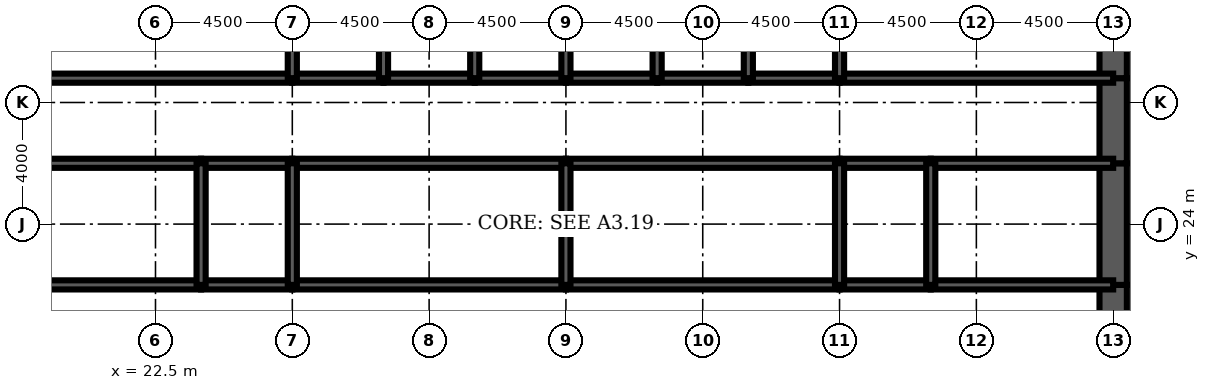
"""IFC4 building model, lengths in metres.
Left out: names, types, materials, properties, quantities, classifications, styles, units other than length and angle.
Written with IfcOpenShell. Run it as: python <this file> out.ifc"""

import sys

from ifc_helpers import new_model, si_unit, direction, frame, frame_2d, origin, place, context, subcontext, project, spatial, rectangle, extrude, element, fill, save


model = new_model("IFC4")
c1 = context("Model", 3, precision=1e-05, world=origin(), true_north=direction((0.0, 1.0)))
c2 = subcontext(c1, "Body", "Model", "MODEL_VIEW")
j1 = project(units=[si_unit("LENGTHUNIT", "METRE"), si_unit("PLANEANGLEUNIT", "RADIAN")], contexts=[c1])
p1 = place(None, origin())
s1 = spatial("IfcSite", under=j1, at=p1, CompositionType="ELEMENT")
p2 = place(p1, origin())
s2 = spatial("IfcBuilding", under=s1, at=p2, CompositionType="ELEMENT")
p3 = place(p2, frame((0.0, 0.0, 81.5)))
s3 = spatial("IfcBuildingStorey", under=s2, at=p3, CompositionType="ELEMENT", Elevation=81.5)
p4 = place(p3, frame((54.0, 19.2, 0.0), z_axis=(0.0, 0.0, 1.0), x_axis=(0.0, 1.0, 0.0)))
e1 = element("IfcWall", 1, at=p4, inside=s3, PredefinedType="SHEAR", context=c2, shape_type="SweptSolid", body=[
    extrude(rectangle(XDim=2.8, YDim=0.9, at=frame_2d((1.4, 0.0))), origin(), (0.0, 0.0, 1.0), 4.5),
])
p5 = place(p4, frame((0.4, 0.0, 0.0)))
e2 = element("IfcOpeningElement", 2, at=p5, cuts=e1, PredefinedType="OPENING", context=c2, shape_type="SweptSolid", body=[
    extrude(rectangle(XDim=1.8, YDim=2.1, at=frame_2d((0.9, 1.05))), frame((0.0, 0.46, 0.0), z_axis=(0.0, -1.0, 0.0), x_axis=(1.0, 0.0, 0.0)), (0.0, 0.0, 1.0), 0.92),
])
p6 = place(p3, frame((54.0, 22.0, 0.0), z_axis=(0.0, 0.0, 1.0), x_axis=(0.0, 1.0, 0.0)))
e3 = element("IfcWall", 3, at=p6, inside=s3, PredefinedType="SHEAR", context=c2, shape_type="SweptSolid", body=[
    extrude(rectangle(XDim=4.0, YDim=0.9, at=frame_2d((2.0, 0.0))), origin(), (0.0, 0.0, 1.0), 4.5),
])
p7 = place(p3, frame((54.0, 26.0, 0.0), z_axis=(0.0, 0.0, 1.0), x_axis=(0.0, 1.0, 0.0)))
e4 = element("IfcWall", 4, at=p7, inside=s3, PredefinedType="SHEAR", context=c2, shape_type="SweptSolid", body=[
    extrude(rectangle(XDim=2.8, YDim=0.9, at=frame_2d((1.4, 0.0))), origin(), (0.0, 0.0, 1.0), 4.5),
])
p8 = place(p7, frame((0.6, 0.0, 0.0)))
e5 = element("IfcOpeningElement", 5, at=p8, cuts=e4, PredefinedType="OPENING", context=c2, shape_type="SweptSolid", body=[
    extrude(rectangle(XDim=1.8, YDim=2.1, at=frame_2d((0.9, 1.05))), frame((0.0, 0.46, 0.0), z_axis=(0.0, -1.0, 0.0), x_axis=(1.0, 0.0, 0.0)), (0.0, 0.0, 1.0), 0.92),
])
p9 = place(p3, frame((54.0, 28.8, 0.0), z_axis=(0.0, 0.0, 1.0), x_axis=(0.0, 1.0, 0.0)))
e6 = element("IfcWall", 6, at=p9, inside=s3, PredefinedType="SHEAR", context=c2, shape_type="SweptSolid", body=[
    extrude(rectangle(XDim=3.2, YDim=0.9, at=frame_2d((1.6, 0.0))), origin(), (0.0, 0.0, 1.0), 4.5),
])
p10 = place(p3, frame((18.0, 28.8, 0.0), z_axis=(0.0, 0.0, 1.0), x_axis=(1.0, 0.0, 0.0)))
e7 = element("IfcWall", 7, at=p10, inside=s3, PredefinedType="SOLIDWALL", context=c2, shape_type="SweptSolid", body=[
    extrude(rectangle(XDim=9.0, YDim=0.3, at=frame_2d((4.5, 0.0))), origin(), (0.0, 0.0, 1.0), 4.5),
])
p11 = place(p10, frame((0.65, 0.0, 0.0)))
e8 = element("IfcOpeningElement", 8, at=p11, cuts=e7, PredefinedType="OPENING", context=c2, shape_type="SweptSolid", body=[
    extrude(rectangle(XDim=1.0, YDim=2.1, at=frame_2d((0.5, 1.05))), frame((0.0, 0.16, 0.0), z_axis=(0.0, -1.0, 0.0), x_axis=(1.0, 0.0, 0.0)), (0.0, 0.0, 1.0), 0.32),
])
p12 = place(p3, frame((27.0, 28.8, 0.0), z_axis=(0.0, 0.0, 1.0), x_axis=(1.0, 0.0, 0.0)))
e9 = element("IfcWall", 9, at=p12, inside=s3, PredefinedType="SOLIDWALL", context=c2, shape_type="SweptSolid", body=[
    extrude(rectangle(XDim=3.0, YDim=0.3, at=frame_2d((1.5, 0.0))), origin(), (0.0, 0.0, 1.0), 4.5),
])
p13 = place(p12, frame((0.95, 0.0, 0.0)))
e10 = element("IfcOpeningElement", 10, at=p13, cuts=e9, PredefinedType="OPENING", context=c2, shape_type="SweptSolid", body=[
    extrude(rectangle(XDim=1.1, YDim=2.2, at=frame_2d((0.55, 1.1))), frame((0.0, 0.16, 0.0), z_axis=(0.0, -1.0, 0.0), x_axis=(1.0, 0.0, 0.0)), (0.0, 0.0, 1.0), 0.32),
])
p14 = place(p3, frame((30.0, 28.8, 0.0), z_axis=(0.0, 0.0, 1.0), x_axis=(1.0, 0.0, 0.0)))
e11 = element("IfcWall", 11, at=p14, inside=s3, PredefinedType="SOLIDWALL", context=c2, shape_type="SweptSolid", body=[
    extrude(rectangle(XDim=3.0, YDim=0.3, at=frame_2d((1.5, 0.0))), origin(), (0.0, 0.0, 1.0), 4.5),
])
p15 = place(p14, frame((0.95, 0.0, 0.0)))
e12 = element("IfcOpeningElement", 12, at=p15, cuts=e11, PredefinedType="OPENING", context=c2, shape_type="SweptSolid", body=[
    extrude(rectangle(XDim=1.1, YDim=2.2, at=frame_2d((0.55, 1.1))), frame((0.0, 0.16, 0.0), z_axis=(0.0, -1.0, 0.0), x_axis=(1.0, 0.0, 0.0)), (0.0, 0.0, 1.0), 0.32),
])
p16 = place(p3, frame((33.0, 28.8, 0.0), z_axis=(0.0, 0.0, 1.0), x_axis=(1.0, 0.0, 0.0)))
e13 = element("IfcWall", 13, at=p16, inside=s3, PredefinedType="SOLIDWALL", context=c2, shape_type="SweptSolid", body=[
    extrude(rectangle(XDim=3.0, YDim=0.3, at=frame_2d((1.5, 0.0))), origin(), (0.0, 0.0, 1.0), 4.5),
])
p17 = place(p16, frame((0.95, 0.0, 0.0)))
e14 = element("IfcOpeningElement", 14, at=p17, cuts=e13, PredefinedType="OPENING", context=c2, shape_type="SweptSolid", body=[
    extrude(rectangle(XDim=1.1, YDim=2.2, at=frame_2d((0.55, 1.1))), frame((0.0, 0.16, 0.0), z_axis=(0.0, -1.0, 0.0), x_axis=(1.0, 0.0, 0.0)), (0.0, 0.0, 1.0), 0.32),
])
for number, where, z_axis, x_axis in (
    (15, (36.0, 28.8, 0.0), (0.0, 0.0, 1.0), (1.0, 0.0, 0.0)),
    (16, (39.0, 28.8, 0.0), (0.0, 0.0, 1.0), (1.0, 0.0, 0.0)),
):
    element("IfcWall", number, at=place(p3, frame(where, z_axis=z_axis, x_axis=x_axis)), inside=s3, PredefinedType="SOLIDWALL", context=c2, shape_type="SweptSolid", body=[
        extrude(rectangle(XDim=3.0, YDim=0.3, at=frame_2d((1.5, 0.0))), origin(), (0.0, 0.0, 1.0), 4.5),
    ])
p18 = place(p3, frame((42.0, 28.8, 0.0), z_axis=(0.0, 0.0, 1.0), x_axis=(1.0, 0.0, 0.0)))
e17 = element("IfcWall", 17, at=p18, inside=s3, PredefinedType="SOLIDWALL", context=c2, shape_type="SweptSolid", body=[
    extrude(rectangle(XDim=3.0, YDim=0.3, at=frame_2d((1.5, 0.0))), origin(), (0.0, 0.0, 1.0), 4.5),
])
p19 = place(p18, frame((0.95, 0.0, 0.0)))
e18 = element("IfcOpeningElement", 18, at=p19, cuts=e17, PredefinedType="OPENING", context=c2, shape_type="SweptSolid", body=[
    extrude(rectangle(XDim=1.1, YDim=2.2, at=frame_2d((0.55, 1.1))), frame((0.0, 0.16, 0.0), z_axis=(0.0, -1.0, 0.0), x_axis=(1.0, 0.0, 0.0)), (0.0, 0.0, 1.0), 0.32),
])
p20 = place(p3, frame((45.0, 28.8, 0.0), z_axis=(0.0, 0.0, 1.0), x_axis=(1.0, 0.0, 0.0)))
e19 = element("IfcWall", 19, at=p20, inside=s3, PredefinedType="SOLIDWALL", context=c2, shape_type="SweptSolid", body=[
    extrude(rectangle(XDim=9.0, YDim=0.3, at=frame_2d((4.5, 0.0))), origin(), (0.0, 0.0, 1.0), 4.5),
])
p21 = place(p20, frame((7.35, 0.0, 0.0)))
e20 = element("IfcOpeningElement", 20, at=p21, cuts=e19, PredefinedType="OPENING", context=c2, shape_type="SweptSolid", body=[
    extrude(rectangle(XDim=1.0, YDim=2.1, at=frame_2d((0.5, 1.05))), frame((0.0, 0.16, 0.0), z_axis=(0.0, -1.0, 0.0), x_axis=(1.0, 0.0, 0.0)), (0.0, 0.0, 1.0), 0.32),
])
p22 = place(p3, frame((18.0, 22.0, 0.0), z_axis=(0.0, 0.0, 1.0), x_axis=(1.0, 0.0, 0.0)))
e21 = element("IfcWall", 21, at=p22, inside=s3, PredefinedType="SOLIDWALL", context=c2, shape_type="SweptSolid", body=[
    extrude(rectangle(XDim=6.0, YDim=0.3, at=frame_2d((3.0, 0.0))), origin(), (0.0, 0.0, 1.0), 4.5),
])
p23 = place(p22, frame((4.4, 0.0, 0.0)))
e22 = element("IfcOpeningElement", 22, at=p23, cuts=e21, PredefinedType="OPENING", context=c2, shape_type="SweptSolid", body=[
    extrude(rectangle(XDim=1.0, YDim=2.1, at=frame_2d((0.5, 1.05))), frame((0.0, 0.16, 0.0), z_axis=(0.0, -1.0, 0.0), x_axis=(1.0, 0.0, 0.0)), (0.0, 0.0, 1.0), 0.32),
])
p24 = place(p22, frame((0.7, 0.0, 0.0)))
e23 = element("IfcOpeningElement", 23, at=p24, cuts=e21, PredefinedType="OPENING", context=c2, shape_type="SweptSolid", body=[
    extrude(rectangle(XDim=1.0, YDim=2.1, at=frame_2d((0.5, 1.05))), frame((0.0, 0.16, 0.0), z_axis=(0.0, -1.0, 0.0), x_axis=(1.0, 0.0, 0.0)), (0.0, 0.0, 1.0), 0.32),
])
p25 = place(p3, frame((24.0, 22.0, 0.0), z_axis=(0.0, 0.0, 1.0), x_axis=(1.0, 0.0, 0.0)))
e24 = element("IfcWall", 24, at=p25, inside=s3, PredefinedType="SOLIDWALL", context=c2, shape_type="SweptSolid", body=[
    extrude(rectangle(XDim=3.0, YDim=0.3, at=frame_2d((1.5, 0.0))), origin(), (0.0, 0.0, 1.0), 4.5),
])
p26 = place(p25, frame((1.0, 0.0, 0.0)))
e25 = element("IfcOpeningElement", 25, at=p26, cuts=e24, PredefinedType="OPENING", context=c2, shape_type="SweptSolid", body=[
    extrude(rectangle(XDim=1.0, YDim=2.1, at=frame_2d((0.5, 1.05))), frame((0.0, 0.16, 0.0), z_axis=(0.0, -1.0, 0.0), x_axis=(1.0, 0.0, 0.0)), (0.0, 0.0, 1.0), 0.32),
])
p27 = place(p3, frame((27.0, 22.0, 0.0), z_axis=(0.0, 0.0, 1.0), x_axis=(1.0, 0.0, 0.0)))
e26 = element("IfcWall", 26, at=p27, inside=s3, PredefinedType="SOLIDWALL", context=c2, shape_type="SweptSolid", body=[
    extrude(rectangle(XDim=9.0, YDim=0.3, at=frame_2d((4.5, 0.0))), origin(), (0.0, 0.0, 1.0), 4.5),
])
p28 = place(p27, frame((4.0, 0.0, 0.0)))
e27 = element("IfcOpeningElement", 27, at=p28, cuts=e26, PredefinedType="OPENING", context=c2, shape_type="SweptSolid", body=[
    extrude(rectangle(XDim=1.0, YDim=2.1, at=frame_2d((0.5, 1.05))), frame((0.0, 0.16, 0.0), z_axis=(0.0, -1.0, 0.0), x_axis=(1.0, 0.0, 0.0)), (0.0, 0.0, 1.0), 0.32),
])
p29 = place(p3, frame((36.0, 22.0, 0.0), z_axis=(0.0, 0.0, 1.0), x_axis=(1.0, 0.0, 0.0)))
e28 = element("IfcWall", 28, at=p29, inside=s3, PredefinedType="SOLIDWALL", context=c2, shape_type="SweptSolid", body=[
    extrude(rectangle(XDim=9.0, YDim=0.3, at=frame_2d((4.5, 0.0))), origin(), (0.0, 0.0, 1.0), 4.5),
])
p30 = place(p29, frame((4.0, 0.0, 0.0)))
e29 = element("IfcOpeningElement", 29, at=p30, cuts=e28, PredefinedType="OPENING", context=c2, shape_type="SweptSolid", body=[
    extrude(rectangle(XDim=1.0, YDim=2.1, at=frame_2d((0.5, 1.05))), frame((0.0, 0.16, 0.0), z_axis=(0.0, -1.0, 0.0), x_axis=(1.0, 0.0, 0.0)), (0.0, 0.0, 1.0), 0.32),
])
p31 = place(p3, frame((45.0, 22.0, 0.0), z_axis=(0.0, 0.0, 1.0), x_axis=(1.0, 0.0, 0.0)))
e30 = element("IfcWall", 30, at=p31, inside=s3, PredefinedType="SOLIDWALL", context=c2, shape_type="SweptSolid", body=[
    extrude(rectangle(XDim=3.0, YDim=0.3, at=frame_2d((1.5, 0.0))), origin(), (0.0, 0.0, 1.0), 4.5),
])
p32 = place(p31, frame((1.0, 0.0, 0.0)))
e31 = element("IfcOpeningElement", 31, at=p32, cuts=e30, PredefinedType="OPENING", context=c2, shape_type="SweptSolid", body=[
    extrude(rectangle(XDim=1.0, YDim=2.1, at=frame_2d((0.5, 1.05))), frame((0.0, 0.16, 0.0), z_axis=(0.0, -1.0, 0.0), x_axis=(1.0, 0.0, 0.0)), (0.0, 0.0, 1.0), 0.32),
])
p33 = place(p3, frame((48.0, 22.0, 0.0), z_axis=(0.0, 0.0, 1.0), x_axis=(1.0, 0.0, 0.0)))
e32 = element("IfcWall", 32, at=p33, inside=s3, PredefinedType="SOLIDWALL", context=c2, shape_type="SweptSolid", body=[
    extrude(rectangle(XDim=6.0, YDim=0.3, at=frame_2d((3.0, 0.0))), origin(), (0.0, 0.0, 1.0), 4.5),
])
p34 = place(p33, frame((2.0, 0.0, 0.0)))
e33 = element("IfcOpeningElement", 33, at=p34, cuts=e32, PredefinedType="OPENING", context=c2, shape_type="SweptSolid", body=[
    extrude(rectangle(XDim=1.0, YDim=2.1, at=frame_2d((0.5, 1.05))), frame((0.0, 0.16, 0.0), z_axis=(0.0, -1.0, 0.0), x_axis=(1.0, 0.0, 0.0)), (0.0, 0.0, 1.0), 0.32),
])
p35 = place(p33, frame((4.15, 0.0, 0.0)))
e34 = element("IfcOpeningElement", 34, at=p35, cuts=e32, PredefinedType="OPENING", context=c2, shape_type="SweptSolid", body=[
    extrude(rectangle(XDim=1.0, YDim=2.1, at=frame_2d((0.5, 1.05))), frame((0.0, 0.16, 0.0), z_axis=(0.0, -1.0, 0.0), x_axis=(1.0, 0.0, 0.0)), (0.0, 0.0, 1.0), 0.32),
])
p36 = place(p3, frame((18.0, 26.0, 0.0), z_axis=(0.0, 0.0, 1.0), x_axis=(1.0, 0.0, 0.0)))
e35 = element("IfcWall", 35, at=p36, inside=s3, PredefinedType="SOLIDWALL", context=c2, shape_type="SweptSolid", body=[
    extrude(rectangle(XDim=6.0, YDim=0.3, at=frame_2d((3.0, 0.0))), origin(), (0.0, 0.0, 1.0), 4.5),
])
p37 = place(p3, frame((24.0, 26.0, 0.0), z_axis=(0.0, 0.0, 1.0), x_axis=(1.0, 0.0, 0.0)))
e36 = element("IfcWall", 36, at=p37, inside=s3, PredefinedType="SOLIDWALL", context=c2, shape_type="SweptSolid", body=[
    extrude(rectangle(XDim=3.0, YDim=0.3, at=frame_2d((1.5, 0.0))), origin(), (0.0, 0.0, 1.0), 4.5),
])
for number, where, z_axis, x_axis in (
    (37, (27.0, 26.0, 0.0), (0.0, 0.0, 1.0), (1.0, 0.0, 0.0)),
    (38, (36.0, 26.0, 0.0), (0.0, 0.0, 1.0), (1.0, 0.0, 0.0)),
):
    element("IfcWall", number, at=place(p3, frame(where, z_axis=z_axis, x_axis=x_axis)), inside=s3, PredefinedType="SOLIDWALL", context=c2, shape_type="SweptSolid", body=[
        extrude(rectangle(XDim=9.0, YDim=0.3, at=frame_2d((4.5, 0.0))), origin(), (0.0, 0.0, 1.0), 4.5),
    ])
p38 = place(p3, frame((45.0, 26.0, 0.0), z_axis=(0.0, 0.0, 1.0), x_axis=(1.0, 0.0, 0.0)))
e39 = element("IfcWall", 39, at=p38, inside=s3, PredefinedType="SOLIDWALL", context=c2, shape_type="SweptSolid", body=[
    extrude(rectangle(XDim=3.0, YDim=0.3, at=frame_2d((1.5, 0.0))), origin(), (0.0, 0.0, 1.0), 4.5),
])
p39 = place(p3, frame((48.0, 26.0, 0.0), z_axis=(0.0, 0.0, 1.0), x_axis=(1.0, 0.0, 0.0)))
e40 = element("IfcWall", 40, at=p39, inside=s3, PredefinedType="SOLIDWALL", context=c2, shape_type="SweptSolid", body=[
    extrude(rectangle(XDim=6.0, YDim=0.3, at=frame_2d((3.0, 0.0))), origin(), (0.0, 0.0, 1.0), 4.5),
])
for number, where, z_axis, x_axis in (
    (41, (27.0, 28.8, 0.0), (0.0, 0.0, 1.0), (0.0, 1.0, 0.0)),
    (42, (30.0, 28.8, 0.0), (0.0, 0.0, 1.0), (0.0, 1.0, 0.0)),
    (43, (33.0, 28.8, 0.0), (0.0, 0.0, 1.0), (0.0, 1.0, 0.0)),
    (44, (36.0, 28.8, 0.0), (0.0, 0.0, 1.0), (0.0, 1.0, 0.0)),
    (45, (39.0, 28.8, 0.0), (0.0, 0.0, 1.0), (0.0, 1.0, 0.0)),
    (46, (42.0, 28.8, 0.0), (0.0, 0.0, 1.0), (0.0, 1.0, 0.0)),
    (47, (45.0, 28.8, 0.0), (0.0, 0.0, 1.0), (0.0, 1.0, 0.0)),
):
    element("IfcWall", number, at=place(p3, frame(where, z_axis=z_axis, x_axis=x_axis)), inside=s3, PredefinedType="SOLIDWALL", context=c2, shape_type="SweptSolid", body=[
        extrude(rectangle(XDim=3.2, YDim=0.3, at=frame_2d((1.6, 0.0))), origin(), (0.0, 0.0, 1.0), 4.5),
    ])
for number, where, z_axis, x_axis in (
    (48, (24.0, 22.0, 0.0), (0.0, 0.0, 1.0), (0.0, 1.0, 0.0)),
    (49, (27.0, 22.0, 0.0), (0.0, 0.0, 1.0), (0.0, 1.0, 0.0)),
    (50, (36.0, 22.0, 0.0), (0.0, 0.0, 1.0), (0.0, 1.0, 0.0)),
    (51, (45.0, 22.0, 0.0), (0.0, 0.0, 1.0), (0.0, 1.0, 0.0)),
    (52, (48.0, 22.0, 0.0), (0.0, 0.0, 1.0), (0.0, 1.0, 0.0)),
):
    element("IfcWall", number, at=place(p3, frame(where, z_axis=z_axis, x_axis=x_axis)), inside=s3, PredefinedType="SOLIDWALL", context=c2, shape_type="SweptSolid", body=[
        extrude(rectangle(XDim=4.0, YDim=0.3, at=frame_2d((2.0, 0.0))), origin(), (0.0, 0.0, 1.0), 4.5),
    ])
for number, where, z_axis, x_axis in (
    (53, (20.025, 22.15, 0.0), (0.0, 0.0, 1.0), (0.0, 1.0, 0.0)),
    (54, (51.675, 22.15, 0.0), (0.0, 0.0, 1.0), (0.0, 1.0, 0.0)),
):
    element("IfcWall", number, at=place(p3, frame(where, z_axis=z_axis, x_axis=x_axis)), inside=s3, PredefinedType="PARTITIONING", context=c2, shape_type="SweptSolid", body=[
        extrude(rectangle(XDim=3.7, YDim=0.15, at=frame_2d((1.85, 0.0))), origin(), (0.0, 0.0, 1.0), 3.0),
    ])
p40 = place(p3, frame((23.7, 26.15, 0.0), z_axis=(0.0, 0.0, 1.0), x_axis=(0.0, 1.0, 0.0)))
e55 = element("IfcWall", 55, at=p40, inside=s3, PredefinedType="PARTITIONING", context=c2, shape_type="SweptSolid", body=[
    extrude(rectangle(XDim=2.5, YDim=0.15, at=frame_2d((1.25, 0.0))), origin(), (0.0, 0.0, 1.0), 3.0),
])
p41 = place(p40, frame((0.35, 0.0, 0.0)))
e56 = element("IfcOpeningElement", 56, at=p41, cuts=e55, PredefinedType="OPENING", context=c2, shape_type="SweptSolid", body=[
    extrude(rectangle(XDim=1.0, YDim=2.1, at=frame_2d((0.5, 1.05))), frame((0.0, 0.085, 0.0), z_axis=(0.0, -1.0, 0.0), x_axis=(1.0, 0.0, 0.0)), (0.0, 0.0, 1.0), 0.17),
])
p42 = place(p41, origin())
e57 = element("IfcDoor", 57, at=p42, inside=s3, OperationType="SINGLE_SWING_LEFT", PredefinedType="DOOR", context=c2, shape_type="SweptSolid", body=[
    extrude(rectangle(XDim=1.0, YDim=2.1, at=frame_2d((0.5, 1.05))), frame((0.0, 0.025, 0.0), z_axis=(0.0, -1.0, 0.0), x_axis=(1.0, 0.0, 0.0)), (0.0, 0.0, 1.0), 0.05),
])
fill(e56, e57)
p43 = place(p19, origin())
e58 = element("IfcDoor", 58, at=p43, inside=s3, OperationType="DOUBLE_DOOR_SLIDING", PredefinedType="USERDEFINED", context=c2, shape_type="SweptSolid", body=[
    extrude(rectangle(XDim=1.1, YDim=2.2, at=frame_2d((0.55, 1.1))), frame((0.0, 0.025, 0.0), z_axis=(0.0, -1.0, 0.0), x_axis=(1.0, 0.0, 0.0)), (0.0, 0.0, 1.0), 0.05),
])
fill(e18, e58)
p44 = place(p13, origin())
e59 = element("IfcDoor", 59, at=p44, inside=s3, OperationType="DOUBLE_DOOR_SLIDING", PredefinedType="USERDEFINED", context=c2, shape_type="SweptSolid", body=[
    extrude(rectangle(XDim=1.1, YDim=2.2, at=frame_2d((0.55, 1.1))), frame((0.0, 0.025, 0.0), z_axis=(0.0, -1.0, 0.0), x_axis=(1.0, 0.0, 0.0)), (0.0, 0.0, 1.0), 0.05),
])
fill(e10, e59)
p45 = place(p15, origin())
e60 = element("IfcDoor", 60, at=p45, inside=s3, OperationType="DOUBLE_DOOR_SLIDING", PredefinedType="USERDEFINED", context=c2, shape_type="SweptSolid", body=[
    extrude(rectangle(XDim=1.1, YDim=2.2, at=frame_2d((0.55, 1.1))), frame((0.0, 0.025, 0.0), z_axis=(0.0, -1.0, 0.0), x_axis=(1.0, 0.0, 0.0)), (0.0, 0.0, 1.0), 0.05),
])
fill(e12, e60)
p46 = place(p17, origin())
e61 = element("IfcDoor", 61, at=p46, inside=s3, OperationType="DOUBLE_DOOR_SLIDING", PredefinedType="USERDEFINED", context=c2, shape_type="SweptSolid", body=[
    extrude(rectangle(XDim=1.1, YDim=2.2, at=frame_2d((0.55, 1.1))), frame((0.0, 0.025, 0.0), z_axis=(0.0, -1.0, 0.0), x_axis=(1.0, 0.0, 0.0)), (0.0, 0.0, 1.0), 0.05),
])
fill(e14, e61)
p47 = place(p11, origin())
e62 = element("IfcDoor", 62, at=p47, inside=s3, OperationType="SINGLE_SWING_LEFT", PredefinedType="DOOR", context=c2, shape_type="SweptSolid", body=[
    extrude(rectangle(XDim=1.0, YDim=2.1, at=frame_2d((0.5, 1.05))), frame((0.0, 0.025, 0.0), z_axis=(0.0, -1.0, 0.0), x_axis=(1.0, 0.0, 0.0)), (0.0, 0.0, 1.0), 0.05),
])
fill(e8, e62)
p48 = place(p21, origin())
e63 = element("IfcDoor", 63, at=p48, inside=s3, OperationType="SINGLE_SWING_RIGHT", PredefinedType="DOOR", context=c2, shape_type="SweptSolid", body=[
    extrude(rectangle(XDim=1.0, YDim=2.1, at=frame_2d((0.5, 1.05))), frame((0.0, 0.025, 0.0), z_axis=(0.0, -1.0, 0.0), x_axis=(1.0, 0.0, 0.0)), (0.0, 0.0, 1.0), 0.05),
])
fill(e20, e63)
p49 = place(p5, origin())
e64 = element("IfcDoor", 64, at=p49, inside=s3, OperationType="SINGLE_SWING_LEFT", PredefinedType="DOOR", context=c2, shape_type="SweptSolid", body=[
    extrude(rectangle(XDim=1.8, YDim=2.1, at=frame_2d((0.9, 1.05))), frame((0.0, 0.45, 0.0), z_axis=(0.0, -1.0, 0.0), x_axis=(1.0, 0.0, 0.0)), (0.0, 0.0, 1.0), 0.899),
])
fill(e2, e64)
p50 = place(p8, origin())
e65 = element("IfcDoor", 65, at=p50, inside=s3, OperationType="SINGLE_SWING_LEFT", PredefinedType="DOOR", context=c2, shape_type="SweptSolid", body=[
    extrude(rectangle(XDim=1.8, YDim=2.1, at=frame_2d((0.9, 1.05))), frame((0.0, 0.45, 0.0), z_axis=(0.0, -1.0, 0.0), x_axis=(1.0, 0.0, 0.0)), (0.0, 0.0, 1.0), 0.899),
])
fill(e5, e65)
p51 = place(p23, origin())
e66 = element("IfcDoor", 66, at=p51, inside=s3, OperationType="SINGLE_SWING_RIGHT", PredefinedType="DOOR", context=c2, shape_type="SweptSolid", body=[
    extrude(rectangle(XDim=1.0, YDim=2.1, at=frame_2d((0.5, 1.05))), frame((0.0, 0.025, 0.0), z_axis=(0.0, -1.0, 0.0), x_axis=(1.0, 0.0, 0.0)), (0.0, 0.0, 1.0), 0.05),
])
fill(e22, e66)
p52 = place(p26, origin())
e67 = element("IfcDoor", 67, at=p52, inside=s3, OperationType="SINGLE_SWING_LEFT", PredefinedType="DOOR", context=c2, shape_type="SweptSolid", body=[
    extrude(rectangle(XDim=1.0, YDim=2.1, at=frame_2d((0.5, 1.05))), frame((0.0, 0.025, 0.0), z_axis=(0.0, -1.0, 0.0), x_axis=(1.0, 0.0, 0.0)), (0.0, 0.0, 1.0), 0.05),
])
fill(e25, e67)
p53 = place(p28, origin())
e68 = element("IfcDoor", 68, at=p53, inside=s3, OperationType="SINGLE_SWING_LEFT", PredefinedType="DOOR", context=c2, shape_type="SweptSolid", body=[
    extrude(rectangle(XDim=1.0, YDim=2.1, at=frame_2d((0.5, 1.05))), frame((0.0, 0.025, 0.0), z_axis=(0.0, -1.0, 0.0), x_axis=(1.0, 0.0, 0.0)), (0.0, 0.0, 1.0), 0.05),
])
fill(e27, e68)
p54 = place(p30, origin())
e69 = element("IfcDoor", 69, at=p54, inside=s3, OperationType="SINGLE_SWING_LEFT", PredefinedType="DOOR", context=c2, shape_type="SweptSolid", body=[
    extrude(rectangle(XDim=1.0, YDim=2.1, at=frame_2d((0.5, 1.05))), frame((0.0, 0.025, 0.0), z_axis=(0.0, -1.0, 0.0), x_axis=(1.0, 0.0, 0.0)), (0.0, 0.0, 1.0), 0.05),
])
fill(e29, e69)
p55 = place(p32, origin())
e70 = element("IfcDoor", 70, at=p55, inside=s3, OperationType="SINGLE_SWING_LEFT", PredefinedType="DOOR", context=c2, shape_type="SweptSolid", body=[
    extrude(rectangle(XDim=1.0, YDim=2.1, at=frame_2d((0.5, 1.05))), frame((0.0, 0.025, 0.0), z_axis=(0.0, -1.0, 0.0), x_axis=(1.0, 0.0, 0.0)), (0.0, 0.0, 1.0), 0.05),
])
fill(e31, e70)
p56 = place(p34, origin())
e71 = element("IfcDoor", 71, at=p56, inside=s3, OperationType="SINGLE_SWING_LEFT", PredefinedType="DOOR", context=c2, shape_type="SweptSolid", body=[
    extrude(rectangle(XDim=1.0, YDim=2.1, at=frame_2d((0.5, 1.05))), frame((0.0, 0.025, 0.0), z_axis=(0.0, -1.0, 0.0), x_axis=(1.0, 0.0, 0.0)), (0.0, 0.0, 1.0), 0.05),
])
fill(e33, e71)
p57 = place(p24, origin())
e72 = element("IfcDoor", 72, at=p57, inside=s3, OperationType="SINGLE_SWING_LEFT", PredefinedType="DOOR", context=c2, shape_type="SweptSolid", body=[
    extrude(rectangle(XDim=1.0, YDim=2.1, at=frame_2d((0.5, 1.05))), frame((0.0, 0.025, 0.0), z_axis=(0.0, -1.0, 0.0), x_axis=(1.0, 0.0, 0.0)), (0.0, 0.0, 1.0), 0.05),
])
fill(e23, e72)
p58 = place(p35, origin())
e73 = element("IfcDoor", 73, at=p58, inside=s3, OperationType="SINGLE_SWING_RIGHT", PredefinedType="DOOR", context=c2, shape_type="SweptSolid", body=[
    extrude(rectangle(XDim=1.0, YDim=2.1, at=frame_2d((0.5, 1.05))), frame((0.0, 0.025, 0.0), z_axis=(0.0, -1.0, 0.0), x_axis=(1.0, 0.0, 0.0)), (0.0, 0.0, 1.0), 0.05),
])
fill(e34, e73)
save(model, sys.argv[1])
